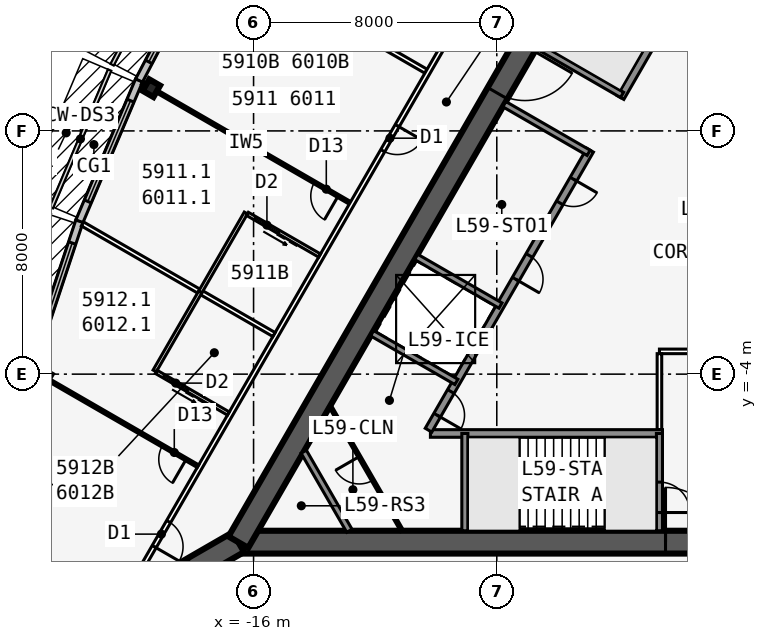
"""IFC4 building model, lengths in metres.
Left out: names, types, materials, properties, quantities, classifications, styles, units other than length and angle.
Written with IfcOpenShell. Run it as: python <this file> out.ifc"""

import sys

from ifc_helpers import new_model, si_unit, direction, frame, frame_2d, origin, origin_2d, place, context, subcontext, project, spatial, rectangle, i_section, extrude, element, fill, save


model = new_model("IFC4")
c1 = context("Model", 3, precision=1e-05, world=origin(), true_north=direction((0.0, 1.0)))
c2 = subcontext(c1, "Body", "Model", "MODEL_VIEW")
j1 = project(units=[si_unit("LENGTHUNIT", "METRE"), si_unit("PLANEANGLEUNIT", "RADIAN")], contexts=[c1])
p1 = place(None, origin())
s1 = spatial("IfcSite", under=j1, at=p1, CompositionType="ELEMENT")
p2 = place(p1, origin())
s2 = spatial("IfcBuilding", under=s1, at=p2, CompositionType="ELEMENT")
p3 = place(p2, frame((0.0, 0.0, 222.5)))
s3 = spatial("IfcBuildingStorey", under=s2, at=p3, CompositionType="ELEMENT", Elevation=222.5)
p4 = place(p3, frame((-16.5, -9.526, 0.0), z_axis=(0.0, 0.0, 1.0), x_axis=(1.0, 0.0, 0.0)))
e1 = element("IfcWall", 1, at=p4, inside=s3, PredefinedType="SHEAR", context=c2, shape_type="SweptSolid", body=[
    extrude(rectangle(XDim=33.0, YDim=0.75, at=frame_2d((16.5, 0.0))), origin(), (0.0, 0.0, 1.0), 3.6),
])
p5 = place(p4, frame((14.05, 0.0, 0.0)))
e2 = element("IfcOpeningElement", 2, at=p5, cuts=e1, PredefinedType="OPENING", context=c2, shape_type="SweptSolid", body=[
    extrude(rectangle(XDim=1.8, YDim=2.13, at=frame_2d((0.9, 1.065))), frame((0.0, 0.385, 0.0), z_axis=(0.0, -1.0, 0.0), x_axis=(1.0, 0.0, 0.0)), (0.0, 0.0, 1.0), 0.77),
])
p6 = place(p3, frame((-10.183, -5.951, 0.0), z_axis=(0.0, 0.0, 1.0), x_axis=(1.0, 0.0, 0.0)))
e3 = element("IfcWall", 3, at=p6, inside=s3, PredefinedType="SOLIDWALL", context=c2, shape_type="SweptSolid", body=[
    extrude(rectangle(XDim=7.633, YDim=0.25, at=frame_2d((3.816, 0.0))), origin(), (0.0, 0.0, 1.0), 3.435),
])
p7 = place(p3, frame((-9.05, -5.951, 0.0), z_axis=(0.0, 0.0, 1.0), x_axis=(0.0, -1.0, 0.0)))
e4 = element("IfcWall", 4, at=p7, inside=s3, PredefinedType="SOLIDWALL", context=c2, shape_type="SweptSolid", body=[
    extrude(rectangle(XDim=3.2, YDim=0.2, at=frame_2d((1.6, 0.0))), origin(), (0.0, 0.0, 1.0), 3.435),
])
p8 = place(p3, frame((-2.65, -5.951, 0.0), z_axis=(0.0, 0.0, 1.0), x_axis=(0.0, -1.0, 0.0)))
e5 = element("IfcWall", 5, at=p8, inside=s3, PredefinedType="SOLIDWALL", context=c2, shape_type="SweptSolid", body=[
    extrude(rectangle(XDim=3.2, YDim=0.2, at=frame_2d((1.6, 0.0))), origin(), (0.0, 0.0, 1.0), 3.435),
])
p9 = place(p8, frame((1.6, 0.0, 0.0)))
e6 = element("IfcOpeningElement", 6, at=p9, cuts=e5, PredefinedType="OPENING", context=c2, shape_type="SweptSolid", body=[
    extrude(rectangle(XDim=1.0, YDim=2.13, at=frame_2d((0.5, 1.065))), frame((0.0, 0.11, 0.0), z_axis=(0.0, -1.0, 0.0), x_axis=(1.0, 0.0, 0.0)), (0.0, 0.0, 1.0), 0.22),
])
p10 = place(p3, frame((0.0, 19.052, 0.0), z_axis=(0.0, 0.0, 1.0), x_axis=(-0.499999749417, -0.866025548458, 0.0)))
e7 = element("IfcWall", 7, at=p10, inside=s3, PredefinedType="SHEAR", context=c2, shape_type="SweptSolid", body=[
    extrude(rectangle(XDim=33.0, YDim=0.75, at=frame_2d((16.5, 0.0))), origin(), (0.0, 0.0, 1.0), 3.6),
])
p11 = place(p10, frame((14.15, 0.0, 0.0)))
e8 = element("IfcOpeningElement", 8, at=p11, cuts=e7, PredefinedType="OPENING", context=c2, shape_type="SweptSolid", body=[
    extrude(rectangle(XDim=1.8, YDim=2.13, at=frame_2d((0.9, 1.065))), frame((0.0, 0.385, 0.0), z_axis=(0.0, -1.0, 0.0), x_axis=(1.0, 0.0, 0.0)), (0.0, 0.0, 1.0), 0.77),
])
p12 = place(p10, frame((12.6, 0.0, 0.0)))
e9 = element("IfcOpeningElement", 9, at=p12, cuts=e7, PredefinedType="OPENING", context=c2, shape_type="SweptSolid", body=[
    extrude(rectangle(XDim=1.0, YDim=2.13, at=frame_2d((0.5, 1.065))), frame((0.0, 0.385, 0.0), z_axis=(0.0, -1.0, 0.0), x_axis=(1.0, 0.0, 0.0)), (0.0, 0.0, 1.0), 0.77),
])
p13 = place(p3, frame((-0.062, 11.794, 0.0), z_axis=(0.0, 0.0, 1.0), x_axis=(-0.500006680225, -0.86602154692, 0.0)))
e10 = element("IfcWall", 10, at=p13, inside=s3, PredefinedType="SOLIDWALL", context=c2, shape_type="SweptSolid", body=[
    extrude(rectangle(XDim=7.733, YDim=0.25, at=frame_2d((3.866, 0.0))), origin(), (0.0, 0.0, 1.0), 3.435),
])
p14 = place(p3, frame((-4.929, 3.365, 0.0), z_axis=(0.0, 0.0, 1.0), x_axis=(-0.499991433582, -0.866030349552, 0.0)))
e11 = element("IfcWall", 11, at=p14, inside=s3, PredefinedType="SOLIDWALL", context=c2, shape_type="SweptSolid", body=[
    extrude(rectangle(XDim=10.633, YDim=0.25, at=frame_2d((5.316, 0.0))), origin(), (0.0, 0.0, 1.0), 3.435),
])
p15 = place(p14, frame((9.164, 0.0, 0.0)))
e12 = element("IfcOpeningElement", 12, at=p15, cuts=e11, PredefinedType="OPENING", context=c2, shape_type="SweptSolid", body=[
    extrude(rectangle(XDim=0.9, YDim=2.13, at=frame_2d((0.45, 1.065))), frame((0.0, 0.135, 0.0), z_axis=(0.0, -1.0, 0.0), x_axis=(1.0, 0.0, 0.0)), (0.0, 0.0, 1.0), 0.27),
])
p16 = place(p14, frame((1.1, 0.0, 0.0)))
e13 = element("IfcOpeningElement", 13, at=p16, cuts=e11, PredefinedType="OPENING", context=c2, shape_type="SweptSolid", body=[
    extrude(rectangle(XDim=0.9, YDim=2.13, at=frame_2d((0.45, 1.065))), frame((0.0, 0.135, 0.0), z_axis=(0.0, -1.0, 0.0), x_axis=(1.0, 0.0, 0.0)), (0.0, 0.0, 1.0), 0.27),
])
p17 = place(p14, frame((4.0, 0.0, 0.0)))
e14 = element("IfcOpeningElement", 14, at=p17, cuts=e11, PredefinedType="OPENING", context=c2, shape_type="SweptSolid", body=[
    extrude(rectangle(XDim=0.9, YDim=2.13, at=frame_2d((0.45, 1.065))), frame((0.0, 0.135, 0.0), z_axis=(0.0, -1.0, 0.0), x_axis=(1.0, 0.0, 0.0)), (0.0, 0.0, 1.0), 0.27),
])
for number, where, z_axis, x_axis in (
    (15, (-3.879, 5.184, 0.0), (0.0, 0.0, 1.0), (-0.866, 0.5, 0.0)),
    (16, (-4.979, 3.279, 0.0), (0.0, 0.0, 1.0), (-0.866, 0.5, 0.0)),
    (17, (-7.879, -1.744, 0.0), (0.0, 0.0, 1.0), (-0.866, 0.5, 0.0)),
):
    element("IfcWall", number, at=place(p3, frame(where, z_axis=z_axis, x_axis=x_axis)), inside=s3, PredefinedType="SOLIDWALL", context=c2, shape_type="SweptSolid", body=[
        extrude(rectangle(XDim=3.2, YDim=0.2, at=frame_2d((1.6, 0.0))), origin(), (0.0, 0.0, 1.0), 3.435),
    ])
p18 = place(p3, frame((-9.329, -4.256, 0.0), z_axis=(0.0, 0.0, 1.0), x_axis=(-0.866022944154, 0.50000426018, 0.0)))
e18 = element("IfcWall", 18, at=p18, inside=s3, PredefinedType="SOLIDWALL", context=c2, shape_type="SweptSolid", body=[
    extrude(rectangle(XDim=3.2, YDim=0.2, at=frame_2d((1.6, 0.0))), origin(), (0.0, 0.0, 1.0), 3.435),
])
p19 = place(p3, frame((-16.5, -9.526, 0.0), z_axis=(0.0, 0.0, 1.0), x_axis=(-0.866031398331, -0.499989616998, 0.0)))
e19 = element("IfcWall", 19, at=p19, inside=s3, PredefinedType="SHEAR", context=c2, shape_type="SweptSolid", body=[
    extrude(rectangle(XDim=4.746, YDim=0.75, at=frame_2d((2.373, 0.0))), origin(), (0.0, 0.0, 1.0), 3.6),
])
p20 = place(p19, frame((1.725, 0.0, 0.0)))
e20 = element("IfcOpeningElement", 20, at=p20, cuts=e19, PredefinedType="OPENING", context=c2, shape_type="SweptSolid", body=[
    extrude(rectangle(XDim=1.8, YDim=2.13, at=frame_2d((0.9, 1.065))), frame((0.0, 0.385, 0.0), z_axis=(0.0, -1.0, 0.0), x_axis=(1.0, 0.0, 0.0)), (0.0, 0.0, 1.0), 0.77),
])
p21 = place(p3, frame((-19.363, 5.406, 0.0), z_axis=(0.0, 0.0, 1.0), x_axis=(-0.866025403784, 0.5, 0.0)))
e21 = element("IfcColumn", 21, at=p21, inside=s3, PredefinedType="COLUMN", context=c2, shape_type="SweptSolid", body=[
    extrude(i_section(OverallWidth=0.411, OverallDepth=0.434, WebThickness=0.036, FlangeThickness=0.057, at=origin_2d()), origin(), (0.0, 0.0, 1.0), 3.6),
])
p22 = place(p3, frame((-17.45, 10.081, 0.0), z_axis=(0.0, 0.0, 1.0), x_axis=(-0.463976002579, -0.885847768542, 0.0)))
e22 = element("IfcWall", 22, at=p22, inside=s3, PredefinedType="STANDARD", context=c2, shape_type="SweptSolid", body=[
    extrude(rectangle(XDim=5.004, YDim=0.25, at=frame_2d((2.502, 0.0))), origin(), (0.0, 0.0, 1.0), 3.435),
])
p23 = place(p22, frame((0.702, 0.0, 0.45)))
e23 = element("IfcOpeningElement", 23, at=p23, cuts=e22, PredefinedType="OPENING", context=c2, shape_type="SweptSolid", body=[
    extrude(rectangle(XDim=3.6, YDim=2.6, at=frame_2d((1.8, 1.3))), frame((0.0, 0.135, 0.0), z_axis=(0.0, -1.0, 0.0), x_axis=(1.0, 0.0, 0.0)), (0.0, 0.0, 1.0), 0.27),
])
p24 = place(p3, frame((-19.768, 5.657, 0.0), z_axis=(0.0, 0.0, 1.0), x_axis=(-0.390096809471, -0.920773848044, 0.0)))
e24 = element("IfcWall", 24, at=p24, inside=s3, PredefinedType="STANDARD", context=c2, shape_type="SweptSolid", body=[
    extrude(rectangle(XDim=5.038, YDim=0.25, at=frame_2d((2.519, 0.0))), origin(), (0.0, 0.0, 1.0), 3.435),
])
p25 = place(p24, frame((0.719, 0.0, 0.45)))
e25 = element("IfcOpeningElement", 25, at=p25, cuts=e24, PredefinedType="OPENING", context=c2, shape_type="SweptSolid", body=[
    extrude(rectangle(XDim=3.6, YDim=2.6, at=frame_2d((1.8, 1.3))), frame((0.0, 0.135, 0.0), z_axis=(0.0, -1.0, 0.0), x_axis=(1.0, 0.0, 0.0)), (0.0, 0.0, 1.0), 0.27),
])
p26 = place(p3, frame((-21.729, 1.028, 0.0), z_axis=(0.0, 0.0, 1.0), x_axis=(-0.315108478109, -0.949055660656, 0.0)))
e26 = element("IfcWall", 26, at=p26, inside=s3, PredefinedType="STANDARD", context=c2, shape_type="SweptSolid", body=[
    extrude(rectangle(XDim=5.105, YDim=0.25, at=frame_2d((2.552, 0.0))), origin(), (0.0, 0.0, 1.0), 3.435),
])
p27 = place(p26, frame((0.752, 0.0, 0.45)))
e27 = element("IfcOpeningElement", 27, at=p27, cuts=e26, PredefinedType="OPENING", context=c2, shape_type="SweptSolid", body=[
    extrude(rectangle(XDim=3.6, YDim=2.6, at=frame_2d((1.8, 1.3))), frame((0.0, 0.135, 0.0), z_axis=(0.0, -1.0, 0.0), x_axis=(1.0, 0.0, 0.0)), (0.0, 0.0, 1.0), 0.27),
])
p28 = place(p3, frame((-0.425, 22.966, 0.0), z_axis=(0.0, 0.0, 1.0), x_axis=(-0.500000265775, -0.866025250339, 0.0)))
e28 = element("IfcWall", 28, at=p28, inside=s3, PredefinedType="PARTITIONING", context=c2, shape_type="SweptSolid", body=[
    extrude(rectangle(XDim=39.354, YDim=0.15, at=frame_2d((19.677, 0.0))), origin(), (0.0, 0.0, 1.0), 3.435),
])
p29 = place(p28, frame((1.665, 0.0, 0.0)))
e29 = element("IfcOpeningElement", 29, at=p29, cuts=e28, PredefinedType="OPENING", context=c2, shape_type="SweptSolid", body=[
    extrude(rectangle(XDim=0.95, YDim=2.13, at=frame_2d((0.475, 1.065))), frame((0.0, 0.085, 0.0), z_axis=(0.0, -1.0, 0.0), x_axis=(1.0, 0.0, 0.0)), (0.0, 0.0, 1.0), 0.17),
])
p30 = place(p28, frame((11.702, 0.0, 0.0)))
e30 = element("IfcOpeningElement", 30, at=p30, cuts=e28, PredefinedType="OPENING", context=c2, shape_type="SweptSolid", body=[
    extrude(rectangle(XDim=0.95, YDim=2.13, at=frame_2d((0.475, 1.065))), frame((0.0, 0.085, 0.0), z_axis=(0.0, -1.0, 0.0), x_axis=(1.0, 0.0, 0.0)), (0.0, 0.0, 1.0), 0.17),
])
p31 = place(p28, frame((21.702, 0.0, 0.0)))
e31 = element("IfcOpeningElement", 31, at=p31, cuts=e28, PredefinedType="OPENING", context=c2, shape_type="SweptSolid", body=[
    extrude(rectangle(XDim=0.95, YDim=2.13, at=frame_2d((0.475, 1.065))), frame((0.0, 0.085, 0.0), z_axis=(0.0, -1.0, 0.0), x_axis=(1.0, 0.0, 0.0)), (0.0, 0.0, 1.0), 0.17),
])
p32 = place(p28, frame((36.739, 0.0, 0.0)))
e32 = element("IfcOpeningElement", 32, at=p32, cuts=e28, PredefinedType="OPENING", context=c2, shape_type="SweptSolid", body=[
    extrude(rectangle(XDim=0.95, YDim=2.13, at=frame_2d((0.475, 1.065))), frame((0.0, 0.085, 0.0), z_axis=(0.0, -1.0, 0.0), x_axis=(1.0, 0.0, 0.0)), (0.0, 0.0, 1.0), 0.17),
])
p33 = place(p3, frame((-10.329, 5.963, 0.0), z_axis=(0.0, 0.0, 1.0), x_axis=(-0.866016460812, 0.500015489362, 0.0)))
e33 = element("IfcWall", 33, at=p33, inside=s3, PredefinedType="PARTITIONING", context=c2, shape_type="SweptSolid", body=[
    extrude(rectangle(XDim=8.101, YDim=0.15, at=frame_2d((4.051, 0.0))), origin(), (0.0, 0.0, 1.0), 2.589),
])
p34 = place(p3, frame((-12.829, 1.633, 0.0), z_axis=(0.0, 0.0, 1.0), x_axis=(-0.866030558329, 0.49999107196, 0.0)))
e34 = element("IfcWall", 34, at=p34, inside=s3, PredefinedType="PARTITIONING", context=c2, shape_type="SweptSolid", body=[
    extrude(rectangle(XDim=7.894, YDim=0.1, at=frame_2d((3.947, 0.0))), origin(), (0.0, 0.0, 1.0), 2.589),
])
p35 = place(p34, frame((0.45, 0.0, 0.0)))
e35 = element("IfcOpeningElement", 35, at=p35, cuts=e34, PredefinedType="OPENING", context=c2, shape_type="SweptSolid", body=[
    extrude(rectangle(XDim=0.9, YDim=2.13, at=frame_2d((0.45, 1.065))), frame((0.0, 0.06, 0.0), z_axis=(0.0, -1.0, 0.0), x_axis=(1.0, 0.0, 0.0)), (0.0, 0.0, 1.0), 0.12),
])
p36 = place(p3, frame((-15.329, -2.697, 0.0), z_axis=(0.0, 0.0, 1.0), x_axis=(-0.866032413668, 0.499987858329, 0.0)))
e36 = element("IfcWall", 36, at=p36, inside=s3, PredefinedType="PARTITIONING", context=c2, shape_type="SweptSolid", body=[
    extrude(rectangle(XDim=7.273, YDim=0.15, at=frame_2d((3.636, 0.0))), origin(), (0.0, 0.0, 1.0), 2.589),
])
p37 = place(p3, frame((-17.829, -7.027, 0.0), z_axis=(0.0, 0.0, 1.0), x_axis=(-0.866026604282, 0.499997920671, 0.0)))
e37 = element("IfcWall", 37, at=p37, inside=s3, PredefinedType="PARTITIONING", context=c2, shape_type="SweptSolid", body=[
    extrude(rectangle(XDim=6.24, YDim=0.1, at=frame_2d((3.12, 0.0))), origin(), (0.0, 0.0, 1.0), 2.589),
])
p38 = place(p37, frame((0.45, 0.0, 0.0)))
e38 = element("IfcOpeningElement", 38, at=p38, cuts=e37, PredefinedType="OPENING", context=c2, shape_type="SweptSolid", body=[
    extrude(rectangle(XDim=0.9, YDim=2.13, at=frame_2d((0.45, 1.065))), frame((0.0, 0.06, 0.0), z_axis=(0.0, -1.0, 0.0), x_axis=(1.0, 0.0, 0.0)), (0.0, 0.0, 1.0), 0.12),
])
p39 = place(p3, frame((-16.253, 1.301, 0.0), z_axis=(0.0, 0.0, 1.0), x_axis=(-0.499990139034, -0.866031096941, 0.0)))
e39 = element("IfcWall", 39, at=p39, inside=s3, PredefinedType="PLUMBINGWALL", context=c2, shape_type="SweptSolid", body=[
    extrude(rectangle(XDim=3.0, YDim=0.12, at=frame_2d((1.5, 0.0))), origin(), (0.0, 0.0, 1.0), 3.435),
])
p40 = place(p3, frame((-13.829, -0.099, 0.0), z_axis=(0.0, 0.0, 1.0), x_axis=(-0.865997131366, 0.500048966069, 0.0)))
e40 = element("IfcWall", 40, at=p40, inside=s3, PredefinedType="PLUMBINGWALL", context=c2, shape_type="SweptSolid", body=[
    extrude(rectangle(XDim=2.74, YDim=0.12, at=frame_2d((1.37, 0.0))), origin(), (0.0, 0.0, 1.0), 3.435),
])
p41 = place(p40, frame((1.55, 0.0, 0.0)))
e41 = element("IfcOpeningElement", 41, at=p41, cuts=e40, PredefinedType="OPENING", context=c2, shape_type="SweptSolid", body=[
    extrude(rectangle(XDim=0.9, YDim=2.13, at=frame_2d((0.45, 1.065))), frame((0.0, 0.07, 0.0), z_axis=(0.0, -1.0, 0.0), x_axis=(1.0, 0.0, 0.0)), (0.0, 0.0, 1.0), 0.14),
])
p42 = place(p3, frame((-17.753, -1.297, 0.0), z_axis=(0.0, 0.0, 1.0), x_axis=(-0.499990139034, -0.866031096941, 0.0)))
e42 = element("IfcWall", 42, at=p42, inside=s3, PredefinedType="PLUMBINGWALL", context=c2, shape_type="SweptSolid", body=[
    extrude(rectangle(XDim=3.0, YDim=0.12, at=frame_2d((1.5, 0.0))), origin(), (0.0, 0.0, 1.0), 3.435),
])
p43 = place(p3, frame((-16.829, -5.295, 0.0), z_axis=(0.0, 0.0, 1.0), x_axis=(-0.866035715982, 0.499982138324, 0.0)))
e43 = element("IfcWall", 43, at=p43, inside=s3, PredefinedType="PLUMBINGWALL", context=c2, shape_type="SweptSolid", body=[
    extrude(rectangle(XDim=2.74, YDim=0.12, at=frame_2d((1.37, 0.0))), origin(), (0.0, 0.0, 1.0), 3.435),
])
p44 = place(p43, frame((1.55, 0.0, 0.0)))
e44 = element("IfcOpeningElement", 44, at=p44, cuts=e43, PredefinedType="OPENING", context=c2, shape_type="SweptSolid", body=[
    extrude(rectangle(XDim=0.9, YDim=2.13, at=frame_2d((0.45, 1.065))), frame((0.0, 0.07, 0.0), z_axis=(0.0, -1.0, 0.0), x_axis=(1.0, 0.0, 0.0)), (0.0, 0.0, 1.0), 0.14),
])
p45 = place(p3, frame((-2.65, -3.251, 0.0), z_axis=(0.0, 0.0, 1.0), x_axis=(1.0, 0.0, 0.0)))
e45 = element("IfcWall", 45, at=p45, inside=s3, PredefinedType="PARTITIONING", context=c2, shape_type="SweptSolid", body=[
    extrude(rectangle(XDim=8.35, YDim=0.15, at=frame_2d((4.175, 0.0))), origin(), (0.0, 0.0, 1.0), 3.435),
])
p46 = place(p3, frame((-2.65, -5.826, 0.0), z_axis=(0.0, 0.0, 1.0), x_axis=(0.0, 1.0, 0.0)))
e46 = element("IfcWall", 46, at=p46, inside=s3, PredefinedType="PARTITIONING", context=c2, shape_type="SweptSolid", body=[
    extrude(rectangle(XDim=2.5, YDim=0.15, at=frame_2d((1.25, 0.0))), origin(), (0.0, 0.0, 1.0), 3.435),
])
p47 = place(p3, frame((-12.848, -9.151, 0.0), z_axis=(0.0, 0.0, 1.0), x_axis=(-0.499952404951, 0.866052881055, 0.0)))
e47 = element("IfcWall", 47, at=p47, inside=s3, PredefinedType="SOLIDWALL", context=c2, shape_type="SweptSolid", body=[
    extrude(rectangle(XDim=3.002, YDim=0.2, at=frame_2d((1.501, 0.0))), origin(), (0.0, 0.0, 1.0), 3.435),
])
p48 = place(p3, frame((-11.116, -9.151, 0.0), z_axis=(0.0, 0.0, 1.0), x_axis=(-0.499999210213, 0.866025859768, 0.0)))
e48 = element("IfcWall", 48, at=p48, inside=s3, PredefinedType="PARTITIONING", context=c2, shape_type="SweptSolid", body=[
    extrude(rectangle(XDim=4.734, YDim=0.1, at=frame_2d((2.367, 0.0))), origin(), (0.0, 0.0, 1.0), 3.435),
])
p49 = place(p48, frame((1.917, 0.0, 0.0)))
e49 = element("IfcOpeningElement", 49, at=p49, cuts=e48, PredefinedType="OPENING", context=c2, shape_type="SweptSolid", body=[
    extrude(rectangle(XDim=0.9, YDim=2.13, at=frame_2d((0.45, 1.065))), frame((0.0, 0.06, 0.0), z_axis=(0.0, -1.0, 0.0), x_axis=(1.0, 0.0, 0.0)), (0.0, 0.0, 1.0), 0.12),
])
p50 = place(p3, frame((-7.247, -7.576, 0.0), z_axis=(0.0, 0.0, 1.0), x_axis=(1.0, 0.0, 0.0)))
e50 = element("IfcWall", 50, at=p50, inside=s3, PredefinedType="SOLIDWALL", context=c2, shape_type="SweptSolid", body=[
    extrude(rectangle(XDim=2.794, YDim=0.1, at=frame_2d((1.397, 0.0))), origin(), (0.0, 0.0, 1.0), 3.6),
])
p51 = place(p23, origin())
e51 = element("IfcWindow", 51, at=p51, inside=s3, PartitioningType="SINGLE_PANEL", PredefinedType="WINDOW", context=c2, shape_type="SweptSolid", body=[
    extrude(rectangle(XDim=3.6, YDim=2.6, at=frame_2d((1.8, 1.3))), frame((0.0, 0.03, 0.0), z_axis=(0.0, -1.0, 0.0), x_axis=(1.0, 0.0, 0.0)), (0.0, 0.0, 1.0), 0.06),
])
fill(e23, e51)
p52 = place(p25, origin())
e52 = element("IfcWindow", 52, at=p52, inside=s3, PartitioningType="SINGLE_PANEL", PredefinedType="WINDOW", context=c2, shape_type="SweptSolid", body=[
    extrude(rectangle(XDim=3.6, YDim=2.6, at=frame_2d((1.8, 1.3))), frame((0.0, 0.03, 0.0), z_axis=(0.0, -1.0, 0.0), x_axis=(1.0, 0.0, 0.0)), (0.0, 0.0, 1.0), 0.06),
])
fill(e25, e52)
p53 = place(p27, origin())
e53 = element("IfcWindow", 53, at=p53, inside=s3, PartitioningType="SINGLE_PANEL", PredefinedType="WINDOW", context=c2, shape_type="SweptSolid", body=[
    extrude(rectangle(XDim=3.6, YDim=2.6, at=frame_2d((1.8, 1.3))), frame((0.0, 0.03, 0.0), z_axis=(0.0, -1.0, 0.0), x_axis=(1.0, 0.0, 0.0)), (0.0, 0.0, 1.0), 0.06),
])
fill(e27, e53)
p54 = place(p35, origin())
e54 = element("IfcDoor", 54, at=p54, inside=s3, OperationType="SINGLE_SWING_LEFT", PredefinedType="DOOR", context=c2, shape_type="SweptSolid", body=[
    extrude(rectangle(XDim=0.9, YDim=2.13, at=frame_2d((0.45, 1.065))), frame((0.0, 0.025, 0.0), z_axis=(0.0, -1.0, 0.0), x_axis=(1.0, 0.0, 0.0)), (0.0, 0.0, 1.0), 0.05),
])
fill(e35, e54)
p55 = place(p38, origin())
e55 = element("IfcDoor", 55, at=p55, inside=s3, OperationType="SINGLE_SWING_LEFT", PredefinedType="DOOR", context=c2, shape_type="SweptSolid", body=[
    extrude(rectangle(XDim=0.9, YDim=2.13, at=frame_2d((0.45, 1.065))), frame((0.0, 0.025, 0.0), z_axis=(0.0, -1.0, 0.0), x_axis=(1.0, 0.0, 0.0)), (0.0, 0.0, 1.0), 0.05),
])
fill(e38, e55)
p56 = place(p31, origin())
e56 = element("IfcDoor", 56, at=p56, inside=s3, OperationType="SINGLE_SWING_LEFT", PredefinedType="DOOR", context=c2, shape_type="SweptSolid", body=[
    extrude(rectangle(XDim=0.95, YDim=2.13, at=frame_2d((0.475, 1.065))), frame((0.0, 0.025, 0.0), z_axis=(0.0, -1.0, 0.0), x_axis=(1.0, 0.0, 0.0)), (0.0, 0.0, 1.0), 0.05),
])
fill(e31, e56)
p57 = place(p41, origin())
e57 = element("IfcDoor", 57, at=p57, inside=s3, OperationType="SLIDING_TO_LEFT", PredefinedType="DOOR", context=c2, shape_type="SweptSolid", body=[
    extrude(rectangle(XDim=0.9, YDim=2.13, at=frame_2d((0.45, 1.065))), frame((0.0, 0.025, 0.0), z_axis=(0.0, -1.0, 0.0), x_axis=(1.0, 0.0, 0.0)), (0.0, 0.0, 1.0), 0.05),
])
fill(e41, e57)
p58 = place(p44, origin())
e58 = element("IfcDoor", 58, at=p58, inside=s3, OperationType="SLIDING_TO_LEFT", PredefinedType="DOOR", context=c2, shape_type="SweptSolid", body=[
    extrude(rectangle(XDim=0.9, YDim=2.13, at=frame_2d((0.45, 1.065))), frame((0.0, 0.025, 0.0), z_axis=(0.0, -1.0, 0.0), x_axis=(1.0, 0.0, 0.0)), (0.0, 0.0, 1.0), 0.05),
])
fill(e44, e58)
p59 = place(p32, origin())
e59 = element("IfcDoor", 59, at=p59, inside=s3, OperationType="SINGLE_SWING_RIGHT", PredefinedType="DOOR", context=c2, shape_type="SweptSolid", body=[
    extrude(rectangle(XDim=0.95, YDim=2.13, at=frame_2d((0.475, 1.065))), frame((0.0, 0.025, 0.0), z_axis=(0.0, -1.0, 0.0), x_axis=(1.0, 0.0, 0.0)), (0.0, 0.0, 1.0), 0.05),
])
fill(e32, e59)
p60 = place(p5, origin())
e60 = element("IfcDoor", 60, at=p60, inside=s3, OperationType="DOUBLE_DOOR_SINGLE_SWING", PredefinedType="DOOR", context=c2, shape_type="SweptSolid", body=[
    extrude(rectangle(XDim=1.8, YDim=2.13, at=frame_2d((0.9, 1.065))), frame((0.0, 0.025, 0.0), z_axis=(0.0, -1.0, 0.0), x_axis=(1.0, 0.0, 0.0)), (0.0, 0.0, 1.0), 0.05),
])
fill(e2, e60)
p61 = place(p9, origin())
e61 = element("IfcDoor", 61, at=p61, inside=s3, OperationType="SINGLE_SWING_RIGHT", PredefinedType="DOOR", context=c2, shape_type="SweptSolid", body=[
    extrude(rectangle(XDim=1.0, YDim=2.13, at=frame_2d((0.5, 1.065))), frame((0.0, 0.025, 0.0), z_axis=(0.0, -1.0, 0.0), x_axis=(1.0, 0.0, 0.0)), (0.0, 0.0, 1.0), 0.05),
])
fill(e6, e61)
p62 = place(p11, origin())
e62 = element("IfcDoor", 62, at=p62, inside=s3, OperationType="DOUBLE_DOOR_SINGLE_SWING", PredefinedType="DOOR", context=c2, shape_type="SweptSolid", body=[
    extrude(rectangle(XDim=1.8, YDim=2.13, at=frame_2d((0.9, 1.065))), frame((0.0, 0.025, 0.0), z_axis=(0.0, -1.0, 0.0), x_axis=(1.0, 0.0, 0.0)), (0.0, 0.0, 1.0), 0.05),
])
fill(e8, e62)
p63 = place(p49, origin())
e63 = element("IfcDoor", 63, at=p63, inside=s3, OperationType="SINGLE_SWING_RIGHT", PredefinedType="DOOR", context=c2, shape_type="SweptSolid", body=[
    extrude(rectangle(XDim=0.9, YDim=2.13, at=frame_2d((0.45, 1.065))), frame((0.0, 0.025, 0.0), z_axis=(0.0, -1.0, 0.0), x_axis=(1.0, 0.0, 0.0)), (0.0, 0.0, 1.0), 0.05),
])
fill(e49, e63)
p64 = place(p15, origin())
e64 = element("IfcDoor", 64, at=p64, inside=s3, OperationType="SINGLE_SWING_RIGHT", PredefinedType="DOOR", context=c2, shape_type="SweptSolid", body=[
    extrude(rectangle(XDim=0.9, YDim=2.13, at=frame_2d((0.45, 1.065))), frame((0.0, 0.025, 0.0), z_axis=(0.0, -1.0, 0.0), x_axis=(1.0, 0.0, 0.0)), (0.0, 0.0, 1.0), 0.05),
])
fill(e12, e64)
p65 = place(p16, origin())
e65 = element("IfcDoor", 65, at=p65, inside=s3, OperationType="SINGLE_SWING_LEFT", PredefinedType="DOOR", context=c2, shape_type="SweptSolid", body=[
    extrude(rectangle(XDim=0.9, YDim=2.13, at=frame_2d((0.45, 1.065))), frame((0.0, 0.025, 0.0), z_axis=(0.0, -1.0, 0.0), x_axis=(1.0, 0.0, 0.0)), (0.0, 0.0, 1.0), 0.05),
])
fill(e13, e65)
p66 = place(p17, origin())
e66 = element("IfcDoor", 66, at=p66, inside=s3, OperationType="SINGLE_SWING_RIGHT", PredefinedType="DOOR", context=c2, shape_type="SweptSolid", body=[
    extrude(rectangle(XDim=0.9, YDim=2.13, at=frame_2d((0.45, 1.065))), frame((0.0, 0.025, 0.0), z_axis=(0.0, -1.0, 0.0), x_axis=(1.0, 0.0, 0.0)), (0.0, 0.0, 1.0), 0.05),
])
fill(e14, e66)
save(model, sys.argv[1])
